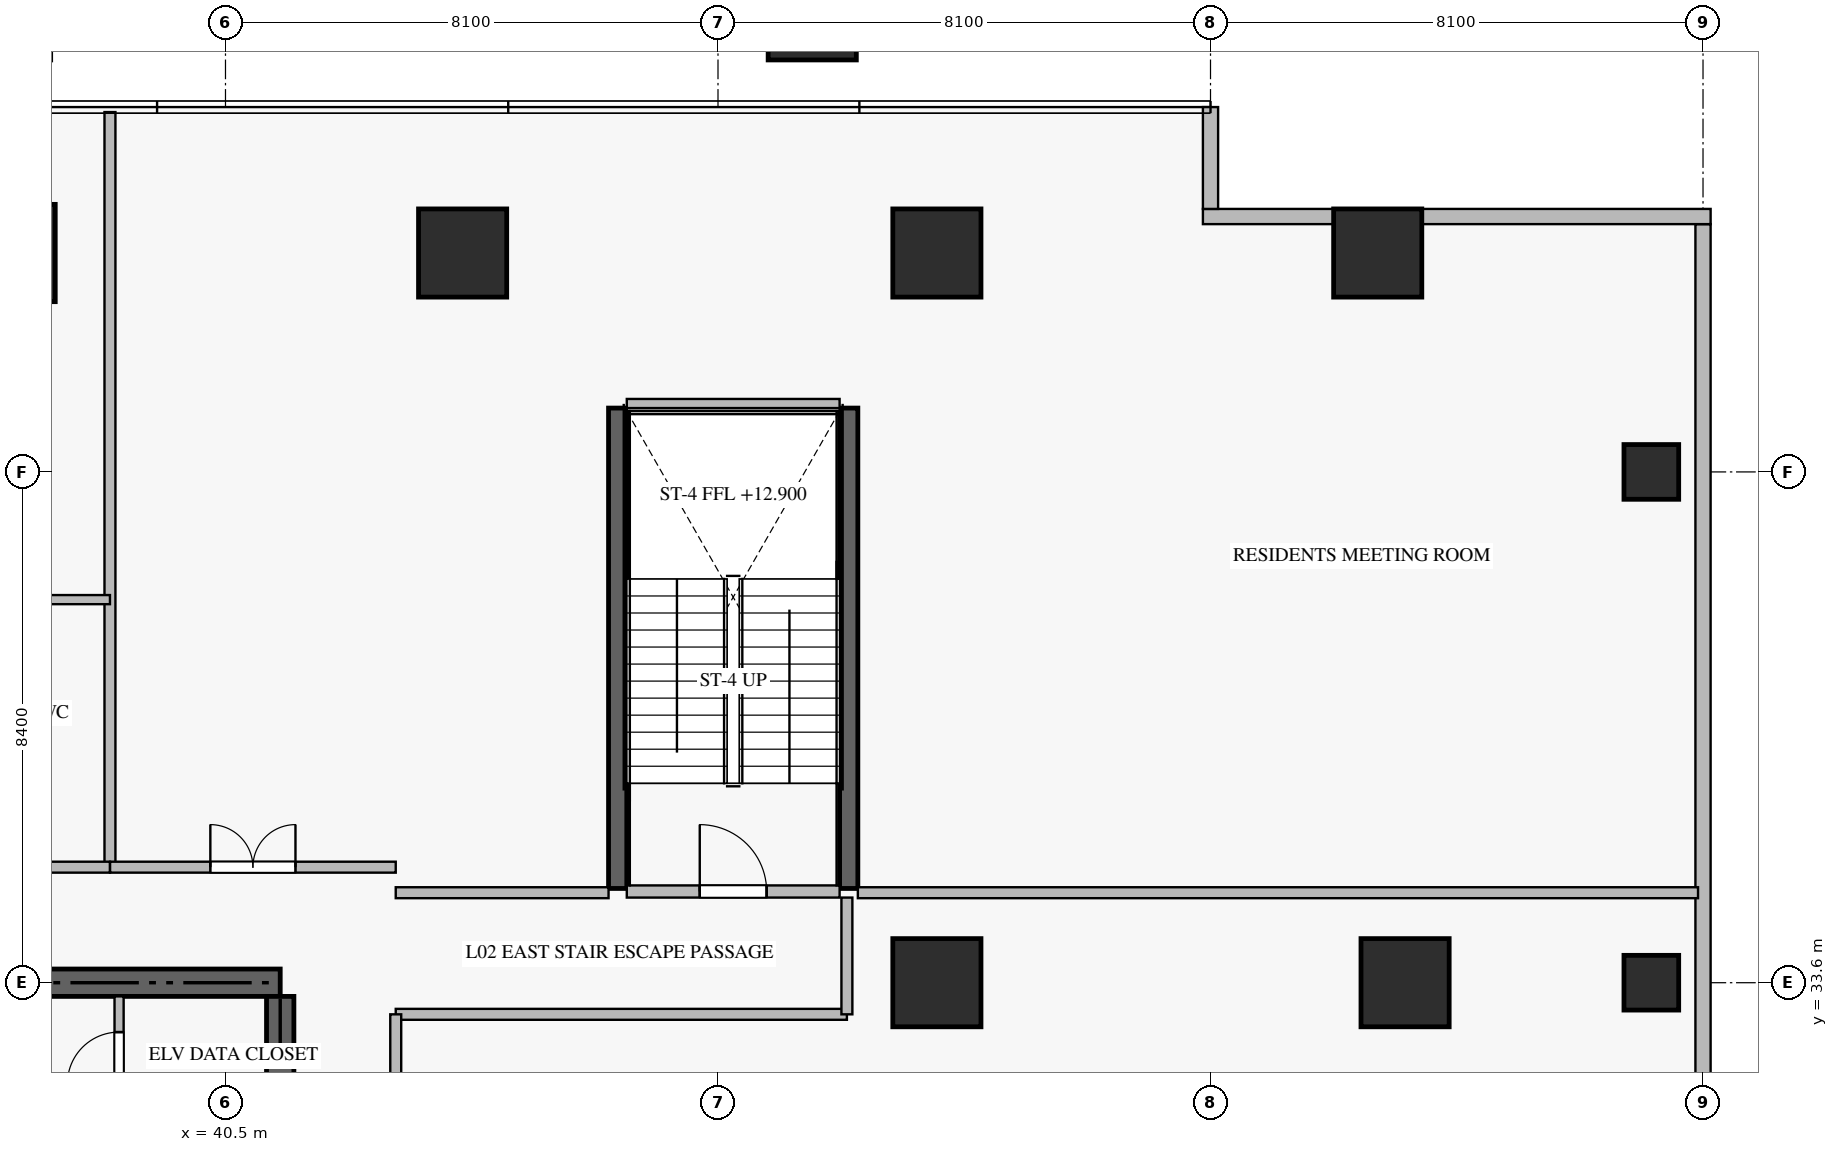
"""IFC4 building model, lengths in metres.
Left out: names, types, materials, properties, quantities, classifications, styles, units other than length and angle.
Written with IfcOpenShell. Run it as: python <this file> out.ifc"""

import sys

from ifc_helpers import new_model, si_unit, direction, frame, frame_2d, origin, origin_2d, place, context, subcontext, project, spatial, rectangle, extrude, source, transform, mapped, element, fill, save


model = new_model("IFC4")
c1 = context("Model", 3, precision=1e-05, world=origin(), true_north=direction((0.0, 1.0)))
c2 = subcontext(c1, "Body", "Model", "MODEL_VIEW")
j1 = project(units=[si_unit("LENGTHUNIT", "METRE"), si_unit("PLANEANGLEUNIT", "RADIAN")], contexts=[c1])
p1 = place(None, origin())
s1 = spatial("IfcSite", under=j1, at=p1, CompositionType="ELEMENT")
p2 = place(p1, origin())
s2 = spatial("IfcBuilding", under=s1, at=p2, CompositionType="ELEMENT")
p3 = place(p2, frame((0.0, 0.0, 10.5)))
s3 = spatial("IfcBuildingStorey", under=s2, at=p3, CompositionType="ELEMENT", Elevation=10.5)
p4 = place(p3, frame((41.4, 33.6, -0.38), z_axis=(0.0, 0.0, 1.0), x_axis=(-1.0, 0.0, 0.0)))
e1 = element("IfcWall", 1, at=p4, inside=s3, PredefinedType="SHEAR", context=c2, shape_type="SweptSolid", body=[
    extrude(rectangle(XDim=18.0, YDim=0.45, at=frame_2d((9.0, 0.0))), origin(), (0.0, 0.0, 1.0), 4.798),
])
p5 = place(p3, frame((41.4, 27.75, -0.38), z_axis=(0.0, 0.0, 1.0), x_axis=(0.0, 1.0, 0.0)))
e2 = element("IfcWall", 2, at=p5, inside=s3, PredefinedType="SHEAR", context=c2, shape_type="SweptSolid", body=[
    extrude(rectangle(XDim=5.625, YDim=0.45, at=frame_2d((2.812, 0.0))), origin(), (0.0, 0.0, 1.0), 4.798),
])
m1 = source(origin(), c2, "Body", "SweptSolid", [
    extrude(rectangle(XDim=0.9, YDim=0.9, at=origin_2d()), origin(), (0.0, 0.0, 1.0), 4.8),
])
for number, where, z_axis, x_axis in (
    (3, (63.95, 33.6, -0.38), (0.0, 0.0, 1.0), (1.0, 0.0, 0.0)),
    (4, (63.95, 42.0, -0.38), (0.0, 0.0, 1.0), (1.0, 0.0, 0.0)),
):
    element("IfcColumn", number, at=place(p3, frame(where, z_axis=z_axis, x_axis=x_axis)), inside=s3, PredefinedType="COLUMN", context=c2, shape_type="MappedRepresentation", body=[
        mapped(m1, transform((0.0, 0.0, 0.0), scale=1.0)),
    ])
m2 = source(origin(), c2, "Body", "SweptSolid", [
    extrude(rectangle(XDim=1.6, YDim=1.6, at=origin_2d()), origin(), (0.0, 0.0, 1.0), 4.8),
])
p6 = place(p3, frame((36.9, 45.6, -0.38), z_axis=(0.0, 0.0, 1.0), x_axis=(1.0, 0.0, 0.0)))
e5 = element("IfcColumn", 5, at=p6, inside=s3, PredefinedType="COLUMN", context=c2, shape_type="MappedRepresentation", body=[
    mapped(m2, transform((0.0, 0.0, 0.0), scale=1.0)),
])
m3 = source(origin(), c2, "Body", "SweptSolid", [
    extrude(rectangle(XDim=1.45, YDim=1.45, at=origin_2d()), origin(), (0.0, 0.0, 1.0), 4.8),
])
for number, where, z_axis, x_axis in (
    (6, (44.4, 45.6, -0.38), (0.0, 0.0, 1.0), (1.0, 0.0, 0.0)),
    (7, (52.2, 45.6, -0.38), (0.0, 0.0, 1.0), (1.0, 0.0, 0.0)),
    (8, (52.2, 33.6, -0.38), (0.0, 0.0, 1.0), (1.0, 0.0, 0.0)),
    (9, (50.15, 49.5, -0.38), (0.0, 0.0, 1.0), (1.0, 0.0, 0.0)),
    (10, (59.9, 33.6, -0.38), (0.0, 0.0, 1.0), (1.0, 0.0, 0.0)),
    (11, (59.45, 45.6, -0.38), (0.0, 0.0, 1.0), (1.0, 0.0, 0.0)),
):
    element("IfcColumn", number, at=place(p3, frame(where, z_axis=z_axis, x_axis=x_axis)), inside=s3, PredefinedType="COLUMN", context=c2, shape_type="MappedRepresentation", body=[
        mapped(m3, transform((0.0, 0.0, 0.0), scale=1.0)),
    ])
p7 = place(p3, frame((64.8, 4.325, 0.0), z_axis=(0.0, 0.0, 1.0), x_axis=(0.0, 1.0, 0.0)))
e12 = element("IfcWall", 12, at=p7, inside=s3, PredefinedType="ELEMENTEDWALL", context=c2, shape_type="SweptSolid", body=[
    extrude(rectangle(XDim=41.75, YDim=0.25, at=frame_2d((20.875, 0.0))), origin(), (0.0, 0.0, 1.0), 4.405),
])
p8 = place(p7, frame((14.953, 0.0, 0.6)))
e13 = element("IfcOpeningElement", 13, at=p8, cuts=e12, PredefinedType="OPENING", context=c2, shape_type="SweptSolid", body=[
    extrude(rectangle(XDim=2.4, YDim=2.6, at=frame_2d((1.2, 1.3))), frame((0.0, 0.135, 0.0), z_axis=(0.0, -1.0, 0.0), x_axis=(1.0, 0.0, 0.0)), (0.0, 0.0, 1.0), 0.27),
])
p9 = place(p7, frame((24.397, 0.0, 0.6)))
e14 = element("IfcOpeningElement", 14, at=p9, cuts=e12, PredefinedType="OPENING", context=c2, shape_type="SweptSolid", body=[
    extrude(rectangle(XDim=2.4, YDim=2.6, at=frame_2d((1.2, 1.3))), frame((0.0, 0.135, 0.0), z_axis=(0.0, -1.0, 0.0), x_axis=(1.0, 0.0, 0.0)), (0.0, 0.0, 1.0), 0.27),
])
p10 = place(p3, frame((64.925, 46.2, 0.0), z_axis=(0.0, 0.0, 1.0), x_axis=(-1.0, 0.0, 0.0)))
e15 = element("IfcWall", 15, at=p10, inside=s3, PredefinedType="ELEMENTEDWALL", context=c2, shape_type="SweptSolid", body=[
    extrude(rectangle(XDim=8.35, YDim=0.25, at=frame_2d((4.175, 0.0))), origin(), (0.0, 0.0, 1.0), 4.405),
])
p11 = place(p3, frame((56.7, 46.325, 0.0), z_axis=(0.0, 0.0, 1.0), x_axis=(0.0, 1.0, 0.0)))
e16 = element("IfcWall", 16, at=p11, inside=s3, PredefinedType="ELEMENTEDWALL", context=c2, shape_type="SweptSolid", body=[
    extrude(rectangle(XDim=1.675, YDim=0.25, at=frame_2d((0.837, 0.0))), origin(), (0.0, 0.0, 1.0), 4.405),
])
for number, where, z_axis, x_axis in (
    (17, (46.95, 35.15, -0.38), (0.0, 0.0, 1.0), (0.0, 1.0, 0.0)),
    (18, (50.75, 35.15, -0.38), (0.0, 0.0, 1.0), (0.0, 1.0, 0.0)),
):
    element("IfcWall", number, at=place(p3, frame(where, z_axis=z_axis, x_axis=x_axis)), inside=s3, PredefinedType="SHEAR", context=c2, shape_type="SweptSolid", body=[
        extrude(rectangle(XDim=7.9, YDim=0.3, at=frame_2d((3.95, 0.0))), origin(), (0.0, 0.0, 1.0), 4.798),
    ])
p12 = place(p3, frame((47.1, 35.1, 0.0), z_axis=(0.0, 0.0, 1.0), x_axis=(1.0, 0.0, 0.0)))
e19 = element("IfcWall", 19, at=p12, inside=s3, PredefinedType="STANDARD", context=c2, shape_type="SweptSolid", body=[
    extrude(rectangle(XDim=3.5, YDim=0.2, at=frame_2d((1.75, 0.0))), origin(), (0.0, 0.0, 1.0), 4.42),
])
p13 = place(p12, frame((1.2, 0.0, 0.0)))
e20 = element("IfcOpeningElement", 20, at=p13, cuts=e19, PredefinedType="OPENING", context=c2, shape_type="SweptSolid", body=[
    extrude(rectangle(XDim=1.1, YDim=2.15, at=frame_2d((0.55, 1.075))), frame((0.0, 0.11, 0.0), z_axis=(0.0, -1.0, 0.0), x_axis=(1.0, 0.0, 0.0)), (0.0, 0.0, 1.0), 0.22),
])
p14 = place(p3, frame((47.1, 43.1, 0.0), z_axis=(0.0, 0.0, 1.0), x_axis=(1.0, 0.0, 0.0)))
e21 = element("IfcWall", 21, at=p14, inside=s3, PredefinedType="STANDARD", context=c2, shape_type="SweptSolid", body=[
    extrude(rectangle(XDim=3.5, YDim=0.2, at=frame_2d((1.75, 0.0))), origin(), (0.0, 0.0, 1.0), 1.885),
])
p15 = place(p3, frame((38.75, 31.352, 0.0), z_axis=(0.0, 0.0, 1.0), x_axis=(0.0, 1.0, 0.0)))
e22 = element("IfcWall", 22, at=p15, inside=s3, PredefinedType="PARTITIONING", context=c2, shape_type="SweptSolid", body=[
    extrude(rectangle(XDim=2.023, YDim=0.15, at=frame_2d((1.011, 0.0))), origin(), (0.0, 0.0, 1.0), 4.42),
])
p16 = place(p15, frame((0.586, 0.0, 0.0)))
e23 = element("IfcOpeningElement", 23, at=p16, cuts=e22, PredefinedType="OPENING", context=c2, shape_type="SweptSolid", body=[
    extrude(rectangle(XDim=0.85, YDim=2.1, at=frame_2d((0.425, 1.05))), frame((0.0, 0.085, 0.0), z_axis=(0.0, -1.0, 0.0), x_axis=(1.0, 0.0, 0.0)), (0.0, 0.0, 1.0), 0.17),
])
p17 = place(p3, frame((43.3, 35.08, 0.0), z_axis=(0.0, 0.0, 1.0), x_axis=(1.0, 0.0, 0.0)))
e24 = element("IfcWall", 24, at=p17, inside=s3, PredefinedType="PARTITIONING", context=c2, shape_type="SweptSolid", body=[
    extrude(rectangle(XDim=3.5, YDim=0.18, at=frame_2d((1.75, 0.0))), origin(), (0.0, 0.0, 1.0), 4.42),
])
p18 = place(p3, frame((43.3, 33.08, 0.0), z_axis=(0.0, 0.0, 1.0), x_axis=(1.0, 0.0, 0.0)))
e25 = element("IfcWall", 25, at=p18, inside=s3, PredefinedType="PARTITIONING", context=c2, shape_type="SweptSolid", body=[
    extrude(rectangle(XDim=7.42, YDim=0.18, at=frame_2d((3.71, 0.0))), origin(), (0.0, 0.0, 1.0), 4.42),
])
p19 = place(p3, frame((50.9, 35.08, 0.0), z_axis=(0.0, 0.0, 1.0), x_axis=(1.0, 0.0, 0.0)))
e26 = element("IfcWall", 26, at=p19, inside=s3, PredefinedType="PARTITIONING", context=c2, shape_type="SweptSolid", body=[
    extrude(rectangle(XDim=13.818, YDim=0.18, at=frame_2d((6.909, 0.0))), origin(), (0.0, 0.0, 1.0), 4.42),
])
p20 = place(p3, frame((50.72, 33.08, 0.0), z_axis=(0.0, 0.0, 1.0), x_axis=(0.0, 1.0, 0.0)))
e27 = element("IfcWall", 27, at=p20, inside=s3, PredefinedType="PARTITIONING", context=c2, shape_type="SweptSolid", body=[
    extrude(rectangle(XDim=1.92, YDim=0.18, at=frame_2d((0.96, 0.0))), origin(), (0.0, 0.0, 1.0), 4.42),
])
p21 = place(p3, frame((43.3, 14.9, 0.0), z_axis=(0.0, 0.0, 1.0), x_axis=(0.0, 1.0, 0.0)))
e28 = element("IfcWall", 28, at=p21, inside=s3, PredefinedType="PARTITIONING", context=c2, shape_type="SweptSolid", body=[
    extrude(rectangle(XDim=18.18, YDim=0.18, at=frame_2d((9.09, 0.0))), origin(), (0.0, 0.0, 1.0), 4.42),
])
p22 = place(p21, frame((8.34, 0.0, 0.0)))
e29 = element("IfcOpeningElement", 29, at=p22, cuts=e28, PredefinedType="OPENING", context=c2, shape_type="SweptSolid", body=[
    extrude(rectangle(XDim=1.5, YDim=2.25, at=frame_2d((0.75, 1.125))), frame((0.0, 0.1, 0.0), z_axis=(0.0, -1.0, 0.0), x_axis=(1.0, 0.0, 0.0)), (0.0, 0.0, 1.0), 0.2),
])
p23 = place(p3, frame((38.6, 35.5, 0.0), z_axis=(0.0, 0.0, 1.0), x_axis=(0.0, 1.0, 0.0)))
e30 = element("IfcWall", 30, at=p23, inside=s3, PredefinedType="PARTITIONING", context=c2, shape_type="SweptSolid", body=[
    extrude(rectangle(XDim=12.418, YDim=0.18, at=frame_2d((6.209, 0.0))), origin(), (0.0, 0.0, 1.0), 4.42),
])
p24 = place(p3, frame((33.602, 35.5, 0.0), z_axis=(0.0, 0.0, 1.0), x_axis=(1.0, 0.0, 0.0)))
e31 = element("IfcWall", 31, at=p24, inside=s3, PredefinedType="PARTITIONING", context=c2, shape_type="SweptSolid", body=[
    extrude(rectangle(XDim=4.998, YDim=0.18, at=frame_2d((2.499, 0.0))), origin(), (0.0, 0.0, 1.0), 4.42),
])
p25 = place(p24, frame((1.999, 0.0, 0.0)))
e32 = element("IfcOpeningElement", 32, at=p25, cuts=e31, PredefinedType="OPENING", context=c2, shape_type="SweptSolid", body=[
    extrude(rectangle(XDim=1.0, YDim=2.15, at=frame_2d((0.5, 1.075))), frame((0.0, 0.1, 0.0), z_axis=(0.0, -1.0, 0.0), x_axis=(1.0, 0.0, 0.0)), (0.0, 0.0, 1.0), 0.2),
])
p26 = place(p3, frame((38.602, 35.5, 0.0), z_axis=(0.0, 0.0, 1.0), x_axis=(1.0, 0.0, 0.0)))
e33 = element("IfcWall", 33, at=p26, inside=s3, PredefinedType="PARTITIONING", context=c2, shape_type="SweptSolid", body=[
    extrude(rectangle(XDim=4.698, YDim=0.18, at=frame_2d((2.349, 0.0))), origin(), (0.0, 0.0, 1.0), 4.42),
])
p27 = place(p26, frame((1.649, 0.0, 0.0)))
e34 = element("IfcOpeningElement", 34, at=p27, cuts=e33, PredefinedType="OPENING", context=c2, shape_type="SweptSolid", body=[
    extrude(rectangle(XDim=1.4, YDim=2.25, at=frame_2d((0.7, 1.125))), frame((0.0, 0.1, 0.0), z_axis=(0.0, -1.0, 0.0), x_axis=(1.0, 0.0, 0.0)), (0.0, 0.0, 1.0), 0.2),
])
p28 = place(p3, frame((26.2, 39.9, 0.0), z_axis=(0.0, 0.0, 1.0), x_axis=(1.0, 0.0, 0.0)))
e35 = element("IfcWall", 35, at=p28, inside=s3, PredefinedType="PARTITIONING", context=c2, shape_type="SweptSolid", body=[
    extrude(rectangle(XDim=12.4, YDim=0.15, at=frame_2d((6.2, 0.0))), origin(), (0.0, 0.0, 1.0), 4.42),
])
p29 = place(p28, frame((2.07, 0.0, 0.0)))
e36 = element("IfcOpeningElement", 36, at=p29, cuts=e35, PredefinedType="OPENING", context=c2, shape_type="SweptSolid", body=[
    extrude(rectangle(XDim=0.9, YDim=2.1, at=frame_2d((0.45, 1.05))), frame((0.0, 0.085, 0.0), z_axis=(0.0, -1.0, 0.0), x_axis=(1.0, 0.0, 0.0)), (0.0, 0.0, 1.0), 0.17),
])
m4 = source(origin(), c2, "Body", "SweptSolid", [
    extrude(rectangle(XDim=1.1, YDim=2.15, at=frame_2d((0.55, 1.075))), frame((0.0, 0.025, 0.0), z_axis=(0.0, -1.0, 0.0), x_axis=(1.0, 0.0, 0.0)), (0.0, 0.0, 1.0), 0.05),
])
p30 = place(p13, origin())
e37 = element("IfcDoor", 37, at=p30, inside=s3, OperationType="SINGLE_SWING_LEFT", PredefinedType="DOOR", context=c2, shape_type="MappedRepresentation", body=[
    mapped(m4, transform((0.0, 0.0, 0.0), scale=1.0)),
])
fill(e20, e37)
m5 = source(origin(), c2, "Body", "SweptSolid", [
    extrude(rectangle(XDim=0.85, YDim=2.1, at=frame_2d((0.425, 1.05))), frame((0.0, 0.025, 0.0), z_axis=(0.0, -1.0, 0.0), x_axis=(1.0, 0.0, 0.0)), (0.0, 0.0, 1.0), 0.05),
])
p31 = place(p16, origin())
e38 = element("IfcDoor", 38, at=p31, inside=s3, OperationType="SINGLE_SWING_LEFT", PredefinedType="DOOR", context=c2, shape_type="MappedRepresentation", body=[
    mapped(m5, transform((0.0, 0.0, 0.0), scale=1.0)),
])
fill(e23, e38)
m6 = source(origin(), c2, "Body", "SweptSolid", [
    extrude(rectangle(XDim=1.4, YDim=2.25, at=frame_2d((0.7, 1.125))), frame((0.0, 0.025, 0.0), z_axis=(0.0, -1.0, 0.0), x_axis=(1.0, 0.0, 0.0)), (0.0, 0.0, 1.0), 0.05),
])
p32 = place(p27, origin())
e39 = element("IfcDoor", 39, at=p32, inside=s3, OperationType="DOUBLE_DOOR_SINGLE_SWING", PredefinedType="DOOR", context=c2, shape_type="MappedRepresentation", body=[
    mapped(m6, transform((0.0, 0.0, 0.0), scale=1.0)),
])
fill(e34, e39)
save(model, sys.argv[1])
